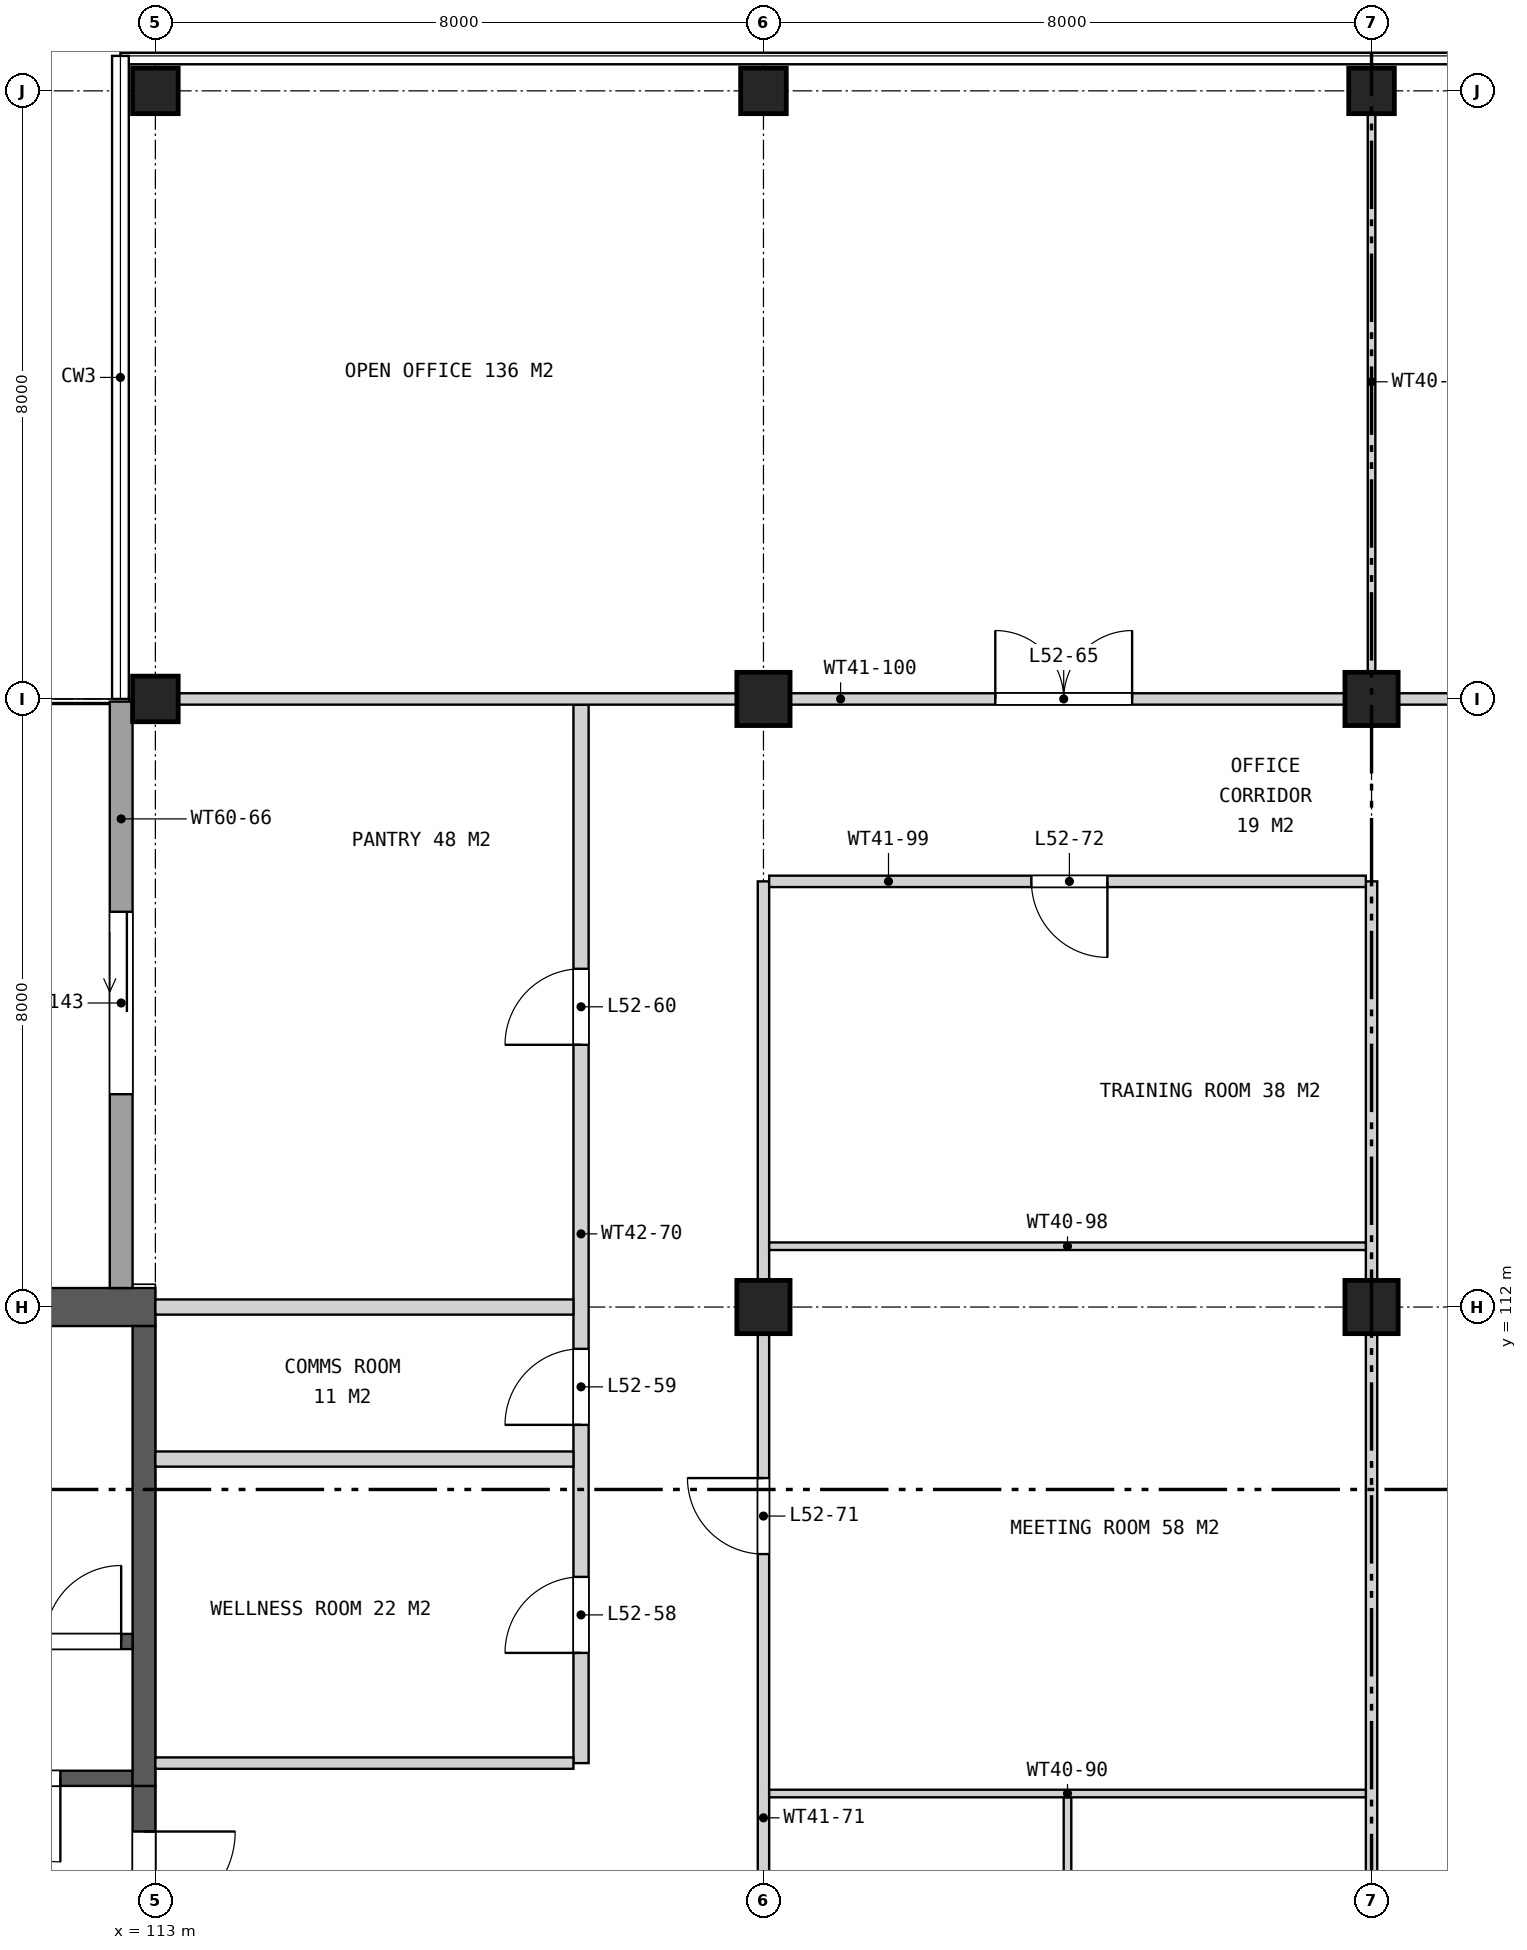
"""IFC4 building model, lengths in metres.
Left out: names, types, materials, properties, quantities, classifications, styles, units other than length and angle.
Written with IfcOpenShell. Run it as: python <this file> out.ifc"""

import sys

from ifc_helpers import new_model, si_unit, direction, frame, frame_2d, origin, origin_2d, place, context, subcontext, project, spatial, rectangle, extrude, element, fill, save


model = new_model("IFC4")
c1 = context("Model", 3, precision=1e-05, world=origin(), true_north=direction((0.0, 1.0)))
c2 = subcontext(c1, "Body", "Model", "MODEL_VIEW")
j1 = project(units=[si_unit("LENGTHUNIT", "METRE"), si_unit("PLANEANGLEUNIT", "RADIAN")], contexts=[c1])
p1 = place(None, origin())
s1 = spatial("IfcSite", under=j1, at=p1, CompositionType="ELEMENT")
p2 = place(p1, origin())
s2 = spatial("IfcBuilding", under=s1, at=p2, CompositionType="ELEMENT")
p3 = place(p2, frame((0.0, 0.0, 245.1)))
s3 = spatial("IfcBuildingStorey", under=s2, at=p3, CompositionType="ELEMENT", Elevation=245.1)
for number, where, z_axis, x_axis in (
    (1, (113.0, 120.0, 0.0), (0.0, 0.0, 1.0), (1.0, 0.0, 0.0)),
    (2, (113.0, 128.0, 0.0), (0.0, 0.0, 1.0), (1.0, 0.0, 0.0)),
):
    element("IfcColumn", number, at=place(p3, frame(where, z_axis=z_axis, x_axis=x_axis)), inside=s3, PredefinedType="COLUMN", context=c2, shape_type="SweptSolid", body=[
        extrude(rectangle(XDim=0.6, YDim=0.6, at=origin_2d()), origin(), (0.0, 0.0, 1.0), 4.2),
    ])
for number, where, z_axis, x_axis in (
    (3, (121.0, 112.0, 0.0), (0.0, 0.0, 1.0), (1.0, 0.0, 0.0)),
    (4, (121.0, 120.0, 0.0), (0.0, 0.0, 1.0), (1.0, 0.0, 0.0)),
):
    element("IfcColumn", number, at=place(p3, frame(where, z_axis=z_axis, x_axis=x_axis)), inside=s3, PredefinedType="COLUMN", context=c2, shape_type="SweptSolid", body=[
        extrude(rectangle(XDim=0.7, YDim=0.7, at=origin_2d()), origin(), (0.0, 0.0, 1.0), 4.2),
    ])
p4 = place(p3, frame((121.0, 128.0, 0.0), z_axis=(0.0, 0.0, 1.0), x_axis=(1.0, 0.0, 0.0)))
e5 = element("IfcColumn", 5, at=p4, inside=s3, PredefinedType="COLUMN", context=c2, shape_type="SweptSolid", body=[
    extrude(rectangle(XDim=0.6, YDim=0.6, at=origin_2d()), origin(), (0.0, 0.0, 1.0), 4.2),
])
for number, where, z_axis, x_axis in (
    (6, (129.0, 112.0, 0.0), (0.0, 0.0, 1.0), (1.0, 0.0, 0.0)),
    (7, (129.0, 120.0, 0.0), (0.0, 0.0, 1.0), (1.0, 0.0, 0.0)),
):
    element("IfcColumn", number, at=place(p3, frame(where, z_axis=z_axis, x_axis=x_axis)), inside=s3, PredefinedType="COLUMN", context=c2, shape_type="SweptSolid", body=[
        extrude(rectangle(XDim=0.7, YDim=0.7, at=origin_2d()), origin(), (0.0, 0.0, 1.0), 4.2),
    ])
p5 = place(p3, frame((129.0, 128.0, 0.0), z_axis=(0.0, 0.0, 1.0), x_axis=(1.0, 0.0, 0.0)))
e8 = element("IfcColumn", 8, at=p5, inside=s3, PredefinedType="COLUMN", context=c2, shape_type="SweptSolid", body=[
    extrude(rectangle(XDim=0.6, YDim=0.6, at=origin_2d()), origin(), (0.0, 0.0, 1.0), 4.2),
])
p6 = place(p3, frame((113.0, 112.0, 0.0), z_axis=(0.0, 0.0, 1.0), x_axis=(-1.0, 0.0, 0.0)))
e9 = element("IfcWall", 9, at=p6, inside=s3, PredefinedType="SHEAR", context=c2, shape_type="SweptSolid", body=[
    extrude(rectangle(XDim=7.1, YDim=0.5, at=frame_2d((3.55, 0.0))), origin(), (0.0, 0.0, 1.0), 4.2),
])
p7 = place(p3, frame((112.85, 105.7, 0.0), z_axis=(0.0, 0.0, 1.0), x_axis=(0.0, -1.0, 0.0)))
e10 = element("IfcWall", 10, at=p7, inside=s3, PredefinedType="SHEAR", context=c2, shape_type="SweptSolid", body=[
    extrude(rectangle(XDim=11.4, YDim=0.3, at=frame_2d((5.7, 0.0))), origin(), (0.0, 0.0, 1.0), 4.2),
])
p8 = place(p7, frame((0.6, 0.0, 0.0)))
e11 = element("IfcOpeningElement", 11, at=p8, cuts=e10, PredefinedType="OPENING", context=c2, shape_type="SweptSolid", body=[
    extrude(rectangle(XDim=2.4, YDim=2.4, at=frame_2d((1.2, 1.2))), frame((0.0, 0.16, 0.0), z_axis=(0.0, -1.0, 0.0), x_axis=(1.0, 0.0, 0.0)), (0.0, 0.0, 1.0), 0.32),
])
p9 = place(p7, frame((4.5, 0.0, 0.0)))
e12 = element("IfcOpeningElement", 12, at=p9, cuts=e10, PredefinedType="OPENING", context=c2, shape_type="SweptSolid", body=[
    extrude(rectangle(XDim=2.4, YDim=2.4, at=frame_2d((1.2, 1.2))), frame((0.0, 0.16, 0.0), z_axis=(0.0, -1.0, 0.0), x_axis=(1.0, 0.0, 0.0)), (0.0, 0.0, 1.0), 0.32),
])
p10 = place(p7, frame((8.4, 0.0, 0.0)))
e13 = element("IfcOpeningElement", 13, at=p10, cuts=e10, PredefinedType="OPENING", context=c2, shape_type="SweptSolid", body=[
    extrude(rectangle(XDim=2.4, YDim=2.4, at=frame_2d((1.2, 1.2))), frame((0.0, 0.16, 0.0), z_axis=(0.0, -1.0, 0.0), x_axis=(1.0, 0.0, 0.0)), (0.0, 0.0, 1.0), 0.32),
])
p11 = place(p3, frame((112.7, 105.8, 0.0), z_axis=(0.0, 0.0, 1.0), x_axis=(-1.0, 0.0, 0.0)))
e14 = element("IfcWall", 14, at=p11, inside=s3, PredefinedType="SHEAR", context=c2, shape_type="SweptSolid", body=[
    extrude(rectangle(XDim=15.45, YDim=0.2, at=frame_2d((7.725, 0.0))), origin(), (0.0, 0.0, 1.0), 4.2),
])
p12 = place(p11, frame((0.95, 0.0, 0.0)))
e15 = element("IfcOpeningElement", 15, at=p12, cuts=e14, PredefinedType="OPENING", context=c2, shape_type="SweptSolid", body=[
    extrude(rectangle(XDim=1.1, YDim=2.1, at=frame_2d((0.55, 1.05))), frame((0.0, 0.11, 0.0), z_axis=(0.0, -1.0, 0.0), x_axis=(1.0, 0.0, 0.0)), (0.0, 0.0, 1.0), 0.22),
])
p13 = place(p3, frame((112.85, 111.75, 0.0), z_axis=(0.0, 0.0, 1.0), x_axis=(0.0, -1.0, 0.0)))
e16 = element("IfcWall", 16, at=p13, inside=s3, PredefinedType="SHEAR", context=c2, shape_type="SweptSolid", body=[
    extrude(rectangle(XDim=6.05, YDim=0.3, at=frame_2d((3.025, 0.0))), origin(), (0.0, 0.0, 1.0), 4.2),
])
p14 = place(p3, frame((112.7, 107.6, 0.0), z_axis=(0.0, 0.0, 1.0), x_axis=(-1.0, 0.0, 0.0)))
e17 = element("IfcWall", 17, at=p14, inside=s3, PredefinedType="SHEAR", context=c2, shape_type="SweptSolid", body=[
    extrude(rectangle(XDim=6.8, YDim=0.2, at=frame_2d((3.4, 0.0))), origin(), (0.0, 0.0, 1.0), 4.2),
])
p15 = place(p14, frame((0.15, 0.0, 0.0)))
e18 = element("IfcOpeningElement", 18, at=p15, cuts=e17, PredefinedType="OPENING", context=c2, shape_type="SweptSolid", body=[
    extrude(rectangle(XDim=1.0, YDim=2.1, at=frame_2d((0.5, 1.05))), frame((0.0, 0.11, 0.0), z_axis=(0.0, -1.0, 0.0), x_axis=(1.0, 0.0, 0.0)), (0.0, 0.0, 1.0), 0.22),
])
p16 = place(p3, frame((112.55, 119.965, 0.0), z_axis=(0.0, 0.0, 1.0), x_axis=(0.0, -1.0, 0.0)))
e19 = element("IfcWall", 19, at=p16, inside=s3, PredefinedType="SOLIDWALL", context=c2, shape_type="SweptSolid", body=[
    extrude(rectangle(XDim=7.715, YDim=0.3, at=frame_2d((3.857, 0.0))), origin(), (0.0, 0.0, 1.0), 3.9),
])
p17 = place(p16, frame((2.765, 0.0, 0.0)))
e20 = element("IfcOpeningElement", 20, at=p17, cuts=e19, PredefinedType="OPENING", context=c2, shape_type="SweptSolid", body=[
    extrude(rectangle(XDim=2.4, YDim=2.4, at=frame_2d((1.2, 1.2))), frame((0.0, 0.16, 0.0), z_axis=(0.0, -1.0, 0.0), x_axis=(1.0, 0.0, 0.0)), (0.0, 0.0, 1.0), 0.32),
])
p18 = place(p3, frame((118.6, 106.0, 0.0), z_axis=(0.0, 0.0, 1.0), x_axis=(0.0, 1.0, 0.0)))
e21 = element("IfcWall", 21, at=p18, inside=s3, PredefinedType="SOLIDWALL", context=c2, shape_type="SweptSolid", body=[
    extrude(rectangle(XDim=13.925, YDim=0.2, at=frame_2d((6.962, 0.0))), origin(), (0.0, 0.0, 1.0), 3.443),
])
p19 = place(p18, frame((1.45, 0.0, 0.0)))
e22 = element("IfcOpeningElement", 22, at=p19, cuts=e21, PredefinedType="OPENING", context=c2, shape_type="SweptSolid", body=[
    extrude(rectangle(XDim=1.0, YDim=2.1, at=frame_2d((0.5, 1.05))), frame((0.0, 0.11, 0.0), z_axis=(0.0, -1.0, 0.0), x_axis=(1.0, 0.0, 0.0)), (0.0, 0.0, 1.0), 0.22),
])
p20 = place(p18, frame((4.45, 0.0, 0.0)))
e23 = element("IfcOpeningElement", 23, at=p20, cuts=e21, PredefinedType="OPENING", context=c2, shape_type="SweptSolid", body=[
    extrude(rectangle(XDim=1.0, YDim=2.1, at=frame_2d((0.5, 1.05))), frame((0.0, 0.11, 0.0), z_axis=(0.0, -1.0, 0.0), x_axis=(1.0, 0.0, 0.0)), (0.0, 0.0, 1.0), 0.22),
])
p21 = place(p18, frame((9.45, 0.0, 0.0)))
e24 = element("IfcOpeningElement", 24, at=p21, cuts=e21, PredefinedType="OPENING", context=c2, shape_type="SweptSolid", body=[
    extrude(rectangle(XDim=1.0, YDim=2.1, at=frame_2d((0.5, 1.05))), frame((0.0, 0.11, 0.0), z_axis=(0.0, -1.0, 0.0), x_axis=(1.0, 0.0, 0.0)), (0.0, 0.0, 1.0), 0.22),
])
p22 = place(p3, frame((121.0, 82.4, 0.0), z_axis=(0.0, 0.0, 1.0), x_axis=(0.0, 1.0, 0.0)))
e25 = element("IfcWall", 25, at=p22, inside=s3, PredefinedType="PARTITIONING", context=c2, shape_type="SweptSolid", body=[
    extrude(rectangle(XDim=35.2, YDim=0.15, at=frame_2d((17.6, 0.0))), origin(), (0.0, 0.0, 1.0), 3.443),
])
p23 = place(p22, frame((10.65, 0.0, 0.0)))
e26 = element("IfcOpeningElement", 26, at=p23, cuts=e25, PredefinedType="OPENING", context=c2, shape_type="SweptSolid", body=[
    extrude(rectangle(XDim=1.0, YDim=2.1, at=frame_2d((0.5, 1.05))), frame((0.0, 0.085, 0.0), z_axis=(0.0, -1.0, 0.0), x_axis=(1.0, 0.0, 0.0)), (0.0, 0.0, 1.0), 0.17),
])
p24 = place(p22, frame((18.75, 0.0, 0.0)))
e27 = element("IfcOpeningElement", 27, at=p24, cuts=e25, PredefinedType="OPENING", context=c2, shape_type="SweptSolid", body=[
    extrude(rectangle(XDim=1.0, YDim=2.1, at=frame_2d((0.5, 1.05))), frame((0.0, 0.085, 0.0), z_axis=(0.0, -1.0, 0.0), x_axis=(1.0, 0.0, 0.0)), (0.0, 0.0, 1.0), 0.17),
])
p25 = place(p22, frame((26.35, 0.0, 0.0)))
e28 = element("IfcOpeningElement", 28, at=p25, cuts=e25, PredefinedType="OPENING", context=c2, shape_type="SweptSolid", body=[
    extrude(rectangle(XDim=1.0, YDim=2.1, at=frame_2d((0.5, 1.05))), frame((0.0, 0.085, 0.0), z_axis=(0.0, -1.0, 0.0), x_axis=(1.0, 0.0, 0.0)), (0.0, 0.0, 1.0), 0.17),
])
p26 = place(p3, frame((125.0, 97.65, 0.0), z_axis=(0.0, 0.0, 1.0), x_axis=(0.0, 1.0, 0.0)))
e29 = element("IfcWall", 29, at=p26, inside=s3, PredefinedType="PARTITIONING", context=c2, shape_type="SweptSolid", body=[
    extrude(rectangle(XDim=7.9, YDim=0.1, at=frame_2d((3.95, 0.0))), origin(), (0.0, 0.0, 1.0), 3.443),
])
p27 = place(p3, frame((129.0, 82.4, 0.0), z_axis=(0.0, 0.0, 1.0), x_axis=(0.0, 1.0, 0.0)))
e30 = element("IfcWall", 30, at=p27, inside=s3, PredefinedType="PARTITIONING", context=c2, shape_type="SweptSolid", body=[
    extrude(rectangle(XDim=35.2, YDim=0.15, at=frame_2d((17.6, 0.0))), origin(), (0.0, 0.0, 1.0), 3.443),
])
p28 = place(p27, frame((18.75, 0.0, 0.0)))
e31 = element("IfcOpeningElement", 31, at=p28, cuts=e30, PredefinedType="OPENING", context=c2, shape_type="SweptSolid", body=[
    extrude(rectangle(XDim=1.0, YDim=2.1, at=frame_2d((0.5, 1.05))), frame((0.0, 0.085, 0.0), z_axis=(0.0, -1.0, 0.0), x_axis=(1.0, 0.0, 0.0)), (0.0, 0.0, 1.0), 0.17),
])
p29 = place(p3, frame((129.0, 120.075, 0.0), z_axis=(0.0, 0.0, 1.0), x_axis=(0.0, 1.0, 0.0)))
e32 = element("IfcWall", 32, at=p29, inside=s3, PredefinedType="PARTITIONING", context=c2, shape_type="SweptSolid", body=[
    extrude(rectangle(XDim=8.195, YDim=0.1, at=frame_2d((4.098, 0.0))), origin(), (0.0, 0.0, 1.0), 3.443),
])
p30 = place(p3, frame((121.075, 105.6, 0.0), z_axis=(0.0, 0.0, 1.0), x_axis=(1.0, 0.0, 0.0)))
e33 = element("IfcWall", 33, at=p30, inside=s3, PredefinedType="PARTITIONING", context=c2, shape_type="SweptSolid", body=[
    extrude(rectangle(XDim=7.85, YDim=0.1, at=frame_2d((3.925, 0.0))), origin(), (0.0, 0.0, 1.0), 3.443),
])
p31 = place(p3, frame((113.0, 106.0, 0.0), z_axis=(0.0, 0.0, 1.0), x_axis=(1.0, 0.0, 0.0)))
e34 = element("IfcWall", 34, at=p31, inside=s3, PredefinedType="PARTITIONING", context=c2, shape_type="SweptSolid", body=[
    extrude(rectangle(XDim=5.5, YDim=0.15, at=frame_2d((2.75, 0.0))), origin(), (0.0, 0.0, 1.0), 3.443),
])
for number, where, z_axis, x_axis in (
    (35, (113.0, 110.0, 0.0), (0.0, 0.0, 1.0), (1.0, 0.0, 0.0)),
    (36, (113.0, 112.0, 0.0), (0.0, 0.0, 1.0), (1.0, 0.0, 0.0)),
):
    element("IfcWall", number, at=place(p3, frame(where, z_axis=z_axis, x_axis=x_axis)), inside=s3, PredefinedType="SOLIDWALL", context=c2, shape_type="SweptSolid", body=[
        extrude(rectangle(XDim=5.5, YDim=0.2, at=frame_2d((2.75, 0.0))), origin(), (0.0, 0.0, 1.0), 3.443),
    ])
p32 = place(p3, frame((121.075, 112.8, 0.0), z_axis=(0.0, 0.0, 1.0), x_axis=(1.0, 0.0, 0.0)))
e37 = element("IfcWall", 37, at=p32, inside=s3, PredefinedType="PARTITIONING", context=c2, shape_type="SweptSolid", body=[
    extrude(rectangle(XDim=7.85, YDim=0.1, at=frame_2d((3.925, 0.0))), origin(), (0.0, 0.0, 1.0), 3.443),
])
p33 = place(p3, frame((121.075, 117.6, 0.0), z_axis=(0.0, 0.0, 1.0), x_axis=(1.0, 0.0, 0.0)))
e38 = element("IfcWall", 38, at=p33, inside=s3, PredefinedType="PARTITIONING", context=c2, shape_type="SweptSolid", body=[
    extrude(rectangle(XDim=7.85, YDim=0.15, at=frame_2d((3.925, 0.0))), origin(), (0.0, 0.0, 1.0), 3.443),
])
p34 = place(p33, frame((3.45, 0.0, 0.0)))
e39 = element("IfcOpeningElement", 39, at=p34, cuts=e38, PredefinedType="OPENING", context=c2, shape_type="SweptSolid", body=[
    extrude(rectangle(XDim=1.0, YDim=2.1, at=frame_2d((0.5, 1.05))), frame((0.0, 0.085, 0.0), z_axis=(0.0, -1.0, 0.0), x_axis=(1.0, 0.0, 0.0)), (0.0, 0.0, 1.0), 0.17),
])
p35 = place(p3, frame((112.73, 120.0, 0.0), z_axis=(0.0, 0.0, 1.0), x_axis=(1.0, 0.0, 0.0)))
e40 = element("IfcWall", 40, at=p35, inside=s3, PredefinedType="PARTITIONING", context=c2, shape_type="SweptSolid", body=[
    extrude(rectangle(XDim=18.57, YDim=0.15, at=frame_2d((9.285, 0.0))), origin(), (0.0, 0.0, 1.0), 3.443),
])
p36 = place(p35, frame((11.32, 0.0, 0.0)))
e41 = element("IfcOpeningElement", 41, at=p36, cuts=e40, PredefinedType="OPENING", context=c2, shape_type="SweptSolid", body=[
    extrude(rectangle(XDim=1.8, YDim=2.1, at=frame_2d((0.9, 1.05))), frame((0.0, 0.085, 0.0), z_axis=(0.0, -1.0, 0.0), x_axis=(1.0, 0.0, 0.0)), (0.0, 0.0, 1.0), 0.17),
])
p37 = place(p8, origin())
e42 = element("IfcDoor", 42, at=p37, inside=s3, OperationType="DOUBLE_DOOR_SINGLE_SWING", PredefinedType="DOOR", context=c2, shape_type="SweptSolid", body=[
    extrude(rectangle(XDim=2.4, YDim=2.4, at=frame_2d((1.2, 1.2))), frame((0.0, 0.025, 0.0), z_axis=(0.0, -1.0, 0.0), x_axis=(1.0, 0.0, 0.0)), (0.0, 0.0, 1.0), 0.05),
])
fill(e11, e42)
p38 = place(p12, origin())
e43 = element("IfcDoor", 43, at=p38, inside=s3, OperationType="SINGLE_SWING_LEFT", PredefinedType="DOOR", context=c2, shape_type="SweptSolid", body=[
    extrude(rectangle(XDim=1.1, YDim=2.1, at=frame_2d((0.55, 1.05))), frame((0.0, 0.025, 0.0), z_axis=(0.0, -1.0, 0.0), x_axis=(1.0, 0.0, 0.0)), (0.0, 0.0, 1.0), 0.05),
])
fill(e15, e43)
p39 = place(p15, frame((1.0, 0.0, 0.0), z_axis=(0.0, 0.0, 1.0), x_axis=(-1.0, 0.0, 0.0)))
e44 = element("IfcDoor", 44, at=p39, inside=s3, OperationType="SINGLE_SWING_RIGHT", PredefinedType="DOOR", context=c2, shape_type="SweptSolid", body=[
    extrude(rectangle(XDim=1.0, YDim=2.1, at=frame_2d((0.5, 1.05))), frame((0.0, 0.025, 0.0), z_axis=(0.0, -1.0, 0.0), x_axis=(1.0, 0.0, 0.0)), (0.0, 0.0, 1.0), 0.05),
])
fill(e18, e44)
p40 = place(p17, frame((2.4, 0.0, 0.0), z_axis=(0.0, 0.0, 1.0), x_axis=(-1.0, 0.0, 0.0)))
e45 = element("IfcDoor", 45, at=p40, inside=s3, OperationType="SLIDING_TO_LEFT", PredefinedType="DOOR", context=c2, shape_type="SweptSolid", body=[
    extrude(rectangle(XDim=2.4, YDim=2.4, at=frame_2d((1.2, 1.2))), frame((0.0, 0.025, 0.0), z_axis=(0.0, -1.0, 0.0), x_axis=(1.0, 0.0, 0.0)), (0.0, 0.0, 1.0), 0.05),
])
fill(e20, e45)
p41 = place(p19, origin())
e46 = element("IfcDoor", 46, at=p41, inside=s3, OperationType="SINGLE_SWING_LEFT", PredefinedType="DOOR", context=c2, shape_type="SweptSolid", body=[
    extrude(rectangle(XDim=1.0, YDim=2.1, at=frame_2d((0.5, 1.05))), frame((0.0, 0.025, 0.0), z_axis=(0.0, -1.0, 0.0), x_axis=(1.0, 0.0, 0.0)), (0.0, 0.0, 1.0), 0.05),
])
fill(e22, e46)
p42 = place(p20, origin())
e47 = element("IfcDoor", 47, at=p42, inside=s3, OperationType="SINGLE_SWING_LEFT", PredefinedType="DOOR", context=c2, shape_type="SweptSolid", body=[
    extrude(rectangle(XDim=1.0, YDim=2.1, at=frame_2d((0.5, 1.05))), frame((0.0, 0.025, 0.0), z_axis=(0.0, -1.0, 0.0), x_axis=(1.0, 0.0, 0.0)), (0.0, 0.0, 1.0), 0.05),
])
fill(e23, e47)
p43 = place(p21, origin())
e48 = element("IfcDoor", 48, at=p43, inside=s3, OperationType="SINGLE_SWING_LEFT", PredefinedType="DOOR", context=c2, shape_type="SweptSolid", body=[
    extrude(rectangle(XDim=1.0, YDim=2.1, at=frame_2d((0.5, 1.05))), frame((0.0, 0.025, 0.0), z_axis=(0.0, -1.0, 0.0), x_axis=(1.0, 0.0, 0.0)), (0.0, 0.0, 1.0), 0.05),
])
fill(e24, e48)
p44 = place(p36, origin())
e49 = element("IfcDoor", 49, at=p44, inside=s3, OperationType="DOUBLE_DOOR_SINGLE_SWING", PredefinedType="DOOR", context=c2, shape_type="SweptSolid", body=[
    extrude(rectangle(XDim=1.8, YDim=2.1, at=frame_2d((0.9, 1.05))), frame((0.0, 0.025, 0.0), z_axis=(0.0, -1.0, 0.0), x_axis=(1.0, 0.0, 0.0)), (0.0, 0.0, 1.0), 0.05),
])
fill(e41, e49)
p45 = place(p25, origin())
e50 = element("IfcDoor", 50, at=p45, inside=s3, OperationType="SINGLE_SWING_RIGHT", PredefinedType="DOOR", context=c2, shape_type="SweptSolid", body=[
    extrude(rectangle(XDim=1.0, YDim=2.1, at=frame_2d((0.5, 1.05))), frame((0.0, 0.025, 0.0), z_axis=(0.0, -1.0, 0.0), x_axis=(1.0, 0.0, 0.0)), (0.0, 0.0, 1.0), 0.05),
])
fill(e28, e50)
p46 = place(p34, frame((1.0, 0.0, 0.0), z_axis=(0.0, 0.0, 1.0), x_axis=(-1.0, 0.0, 0.0)))
e51 = element("IfcDoor", 51, at=p46, inside=s3, OperationType="SINGLE_SWING_LEFT", PredefinedType="DOOR", context=c2, shape_type="SweptSolid", body=[
    extrude(rectangle(XDim=1.0, YDim=2.1, at=frame_2d((0.5, 1.05))), frame((0.0, 0.025, 0.0), z_axis=(0.0, -1.0, 0.0), x_axis=(1.0, 0.0, 0.0)), (0.0, 0.0, 1.0), 0.05),
])
fill(e39, e51)
save(model, sys.argv[1])
